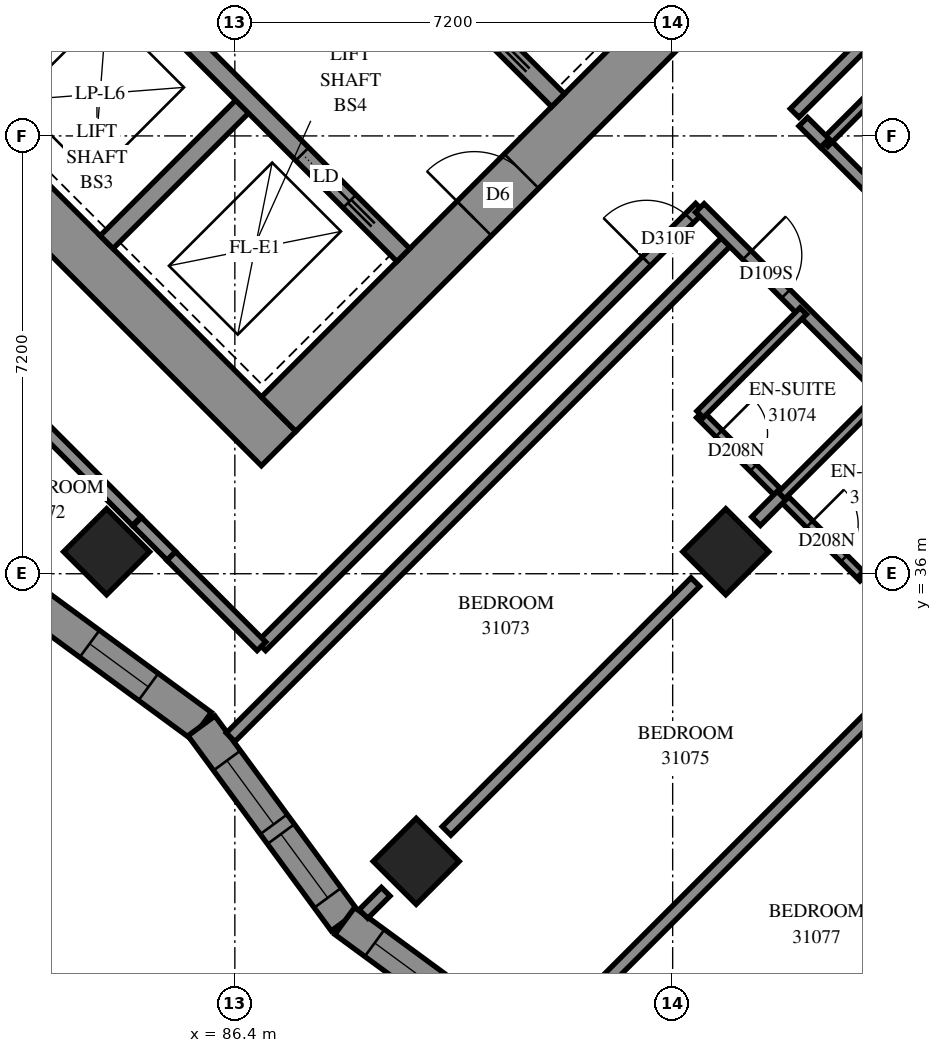
"""IFC4 building model, lengths in metres.
Left out: names, types, materials, properties, quantities, classifications, styles, units other than length and angle.
Written with IfcOpenShell. Run it as: python <this file> out.ifc"""

import sys

from ifc_helpers import new_model, si_unit, direction, frame, frame_2d, origin, origin_2d, place, context, subcontext, project, spatial, polyline, rectangle, outline, extrude, element, fill, save


model = new_model("IFC4")
c1 = context("Model", 3, precision=1e-05, world=origin(), true_north=direction((0.0, 1.0)))
c2 = subcontext(c1, "Body", "Model", "MODEL_VIEW")
j1 = project(units=[si_unit("LENGTHUNIT", "METRE"), si_unit("PLANEANGLEUNIT", "RADIAN")], contexts=[c1])
p1 = place(None, origin())
s1 = spatial("IfcSite", under=j1, at=p1, CompositionType="ELEMENT")
p2 = place(p1, origin())
s2 = spatial("IfcBuilding", under=s1, at=p2, CompositionType="ELEMENT")
p3 = place(p2, frame((0.0, 0.0, 115.2)))
s3 = spatial("IfcBuildingStorey", under=s2, at=p3, CompositionType="ELEMENT", Elevation=115.2)
for number, where, z_axis, x_axis in (
    (1, (84.291, 36.362, 0.0), (0.0, 0.0, 1.0), (0.707, -0.707, 0.0)),
    (2, (94.474, 36.362, 0.0), (0.0, 0.0, 1.0), (0.707, -0.707, 0.0)),
    (3, (89.382, 31.271, 0.0), (0.0, 0.0, 1.0), (0.707, -0.707, 0.0)),
):
    element("IfcColumn", number, at=place(p3, frame(where, z_axis=z_axis, x_axis=x_axis)), inside=s3, PredefinedType="COLUMN", context=c2, shape_type="SweptSolid", body=[
        extrude(rectangle(XDim=1.0, YDim=1.0, at=origin_2d()), origin(), (0.0, 0.0, 1.0), 3.1),
    ])
p4 = place(p3, frame((75.806, 49.373, -0.3), z_axis=(0.0, 0.0, 1.0), x_axis=(0.7071067812, -0.7071067812, 0.0)))
e4 = element("IfcWall", 4, at=p4, inside=s3, PredefinedType="SHEAR", context=c2, shape_type="SweptSolid", body=[
    extrude(rectangle(XDim=16.0, YDim=0.8, at=frame_2d((8.0, 0.0))), origin(), (0.0, 0.0, 1.0), 2.7),
])
p5 = place(p3, frame((87.12, 38.625, -0.3), z_axis=(0.0, 0.0, 1.0), x_axis=(0.7071067812, 0.7071067812, 0.0)))
e5 = element("IfcWall", 5, at=p5, inside=s3, PredefinedType="SHEAR", context=c2, shape_type="SweptSolid", body=[
    extrude(rectangle(XDim=14.4, YDim=0.8, at=frame_2d((7.2, 0.0))), origin(), (0.0, 0.0, 1.0), 2.7),
])
p6 = place(p5, frame((4.55, 0.0, 0.3)))
e6 = element("IfcOpeningElement", 6, at=p6, cuts=e5, PredefinedType="OPENING", context=c2, shape_type="SweptSolid", body=[
    extrude(rectangle(XDim=1.1, YDim=2.1, at=frame_2d((0.55, 1.05))), frame((0.0, 0.41, 0.0), z_axis=(0.0, -1.0, 0.0), x_axis=(1.0, 0.0, 0.0)), (0.0, 0.0, 1.0), 0.82),
])
p7 = place(p5, frame((11.35, 0.0, 0.3)))
e7 = element("IfcOpeningElement", 7, at=p7, cuts=e5, PredefinedType="OPENING", context=c2, shape_type="SweptSolid", body=[
    extrude(rectangle(XDim=1.1, YDim=2.1, at=frame_2d((0.55, 1.05))), frame((0.0, 0.41, 0.0), z_axis=(0.0, -1.0, 0.0), x_axis=(1.0, 0.0, 0.0)), (0.0, 0.0, 1.0), 0.82),
])
for number, where, z_axis, x_axis in (
    (8, (81.746, 43.999, 0.0), (0.0, 0.0, 1.0), (0.707, 0.707, 0.0)),
    (9, (84.291, 41.453, 0.0), (0.0, 0.0, 1.0), (0.707, 0.707, 0.0)),
):
    element("IfcWall", number, at=place(p3, frame(where, z_axis=z_axis, x_axis=x_axis)), inside=s3, PredefinedType="SOLIDWALL", context=c2, shape_type="SweptSolid", body=[
        extrude(rectangle(XDim=3.3, YDim=0.3, at=frame_2d((1.65, 0.0))), origin(), (0.0, 0.0, 1.0), 3.1),
    ])
p8 = place(p3, frame((78.988, 51.423, 0.0), z_axis=(0.0, 0.0, 1.0), x_axis=(0.7071067812, -0.7071067812, 0.0)))
e10 = element("IfcWall", 10, at=p8, inside=s3, PredefinedType="SOLIDWALL", context=c2, shape_type="SweptSolid", body=[
    extrude(rectangle(XDim=14.4, YDim=0.3, at=frame_2d((7.2, 0.0))), origin(), (0.0, 0.0, 1.0), 3.1),
])
p9 = place(p8, frame((1.25, 0.0, 0.0)))
e11 = element("IfcOpeningElement", 11, at=p9, cuts=e10, PredefinedType="OPENING", context=c2, shape_type="SweptSolid", body=[
    extrude(rectangle(XDim=1.1, YDim=2.1, at=frame_2d((0.55, 1.05))), frame((0.0, 0.16, 0.0), z_axis=(0.0, -1.0, 0.0), x_axis=(1.0, 0.0, 0.0)), (0.0, 0.0, 1.0), 0.32),
])
p10 = place(p8, frame((4.85, 0.0, 0.0)))
e12 = element("IfcOpeningElement", 12, at=p10, cuts=e10, PredefinedType="OPENING", context=c2, shape_type="SweptSolid", body=[
    extrude(rectangle(XDim=1.1, YDim=2.1, at=frame_2d((0.55, 1.05))), frame((0.0, 0.16, 0.0), z_axis=(0.0, -1.0, 0.0), x_axis=(1.0, 0.0, 0.0)), (0.0, 0.0, 1.0), 0.32),
])
p11 = place(p8, frame((8.45, 0.0, 0.0)))
e13 = element("IfcOpeningElement", 13, at=p11, cuts=e10, PredefinedType="OPENING", context=c2, shape_type="SweptSolid", body=[
    extrude(rectangle(XDim=1.1, YDim=2.1, at=frame_2d((0.55, 1.05))), frame((0.0, 0.16, 0.0), z_axis=(0.0, -1.0, 0.0), x_axis=(1.0, 0.0, 0.0)), (0.0, 0.0, 1.0), 0.32),
])
p12 = place(p8, frame((12.05, 0.0, 0.0)))
e14 = element("IfcOpeningElement", 14, at=p12, cuts=e10, PredefinedType="OPENING", context=c2, shape_type="SweptSolid", body=[
    extrude(rectangle(XDim=1.1, YDim=2.1, at=frame_2d((0.55, 1.05))), frame((0.0, 0.16, 0.0), z_axis=(0.0, -1.0, 0.0), x_axis=(1.0, 0.0, 0.0)), (0.0, 0.0, 1.0), 0.32),
])
p13 = place(p3, frame((81.534, 53.969, 0.0), z_axis=(0.0, 0.0, 1.0), x_axis=(0.707103309, -0.7071102534, 0.0)))
e15 = element("IfcWall", 15, at=p13, inside=s3, PredefinedType="SOLIDWALL", context=c2, shape_type="SweptSolid", body=[
    extrude(rectangle(XDim=14.4, YDim=0.3, at=frame_2d((7.2, 0.0))), origin(), (0.0, 0.0, 1.0), 3.1),
])
p14 = place(p13, frame((12.05, 0.0, 0.0)))
e16 = element("IfcOpeningElement", 16, at=p14, cuts=e15, PredefinedType="OPENING", context=c2, shape_type="SweptSolid", body=[
    extrude(rectangle(XDim=1.1, YDim=2.1, at=frame_2d((0.55, 1.05))), frame((0.0, 0.16, 0.0), z_axis=(0.0, -1.0, 0.0), x_axis=(1.0, 0.0, 0.0)), (0.0, 0.0, 1.0), 0.32),
])
p15 = place(p3, frame((82.643, 35.854, 0.0), z_axis=(0.0, 0.0, 1.0), x_axis=(0.8060606099, -0.5918329943, 0.0)))
e17 = element("IfcWall", 17, at=p15, inside=s3, PredefinedType="SOLIDWALL", context=c2, shape_type="SweptSolid", body=[
    extrude(outline(polyline([(-0.042, -0.275), (3.938, -0.275), (4.022, 0.275), (0.042, 0.275), (-0.042, -0.275)])), origin(), (0.0, 0.0, 1.0), 3.1),
])
p16 = place(p15, frame((1.698, 0.0, 0.5)))
e18 = element("IfcOpeningElement", 18, at=p16, cuts=e17, PredefinedType="OPENING", context=c2, shape_type="SweptSolid", body=[
    extrude(rectangle(XDim=1.2, YDim=2.45, at=frame_2d((0.6, 1.225))), frame((0.0, 0.285, 0.0), z_axis=(0.0, -1.0, 0.0), x_axis=(1.0, 0.0, 0.0)), (0.0, 0.0, 1.0), 0.57),
])
p17 = place(p3, frame((85.851, 33.498, 0.0), z_axis=(0.0, 0.0, 1.0), x_axis=(0.5918329943, -0.8060606099, 0.0)))
e19 = element("IfcWall", 19, at=p17, inside=s3, PredefinedType="SOLIDWALL", context=c2, shape_type="SweptSolid", body=[
    extrude(outline(polyline([(0.042, -0.275), (4.022, -0.275), (3.938, 0.275), (-0.042, 0.275), (0.042, -0.275)])), origin(), (0.0, 0.0, 1.0), 3.1),
])
p18 = place(p17, frame((0.708, 0.0, 0.5)))
e20 = element("IfcOpeningElement", 20, at=p18, cuts=e19, PredefinedType="OPENING", context=c2, shape_type="SweptSolid", body=[
    extrude(rectangle(XDim=1.3, YDim=2.45, at=frame_2d((0.65, 1.225))), frame((0.0, 0.285, 0.0), z_axis=(0.0, -1.0, 0.0), x_axis=(1.0, 0.0, 0.0)), (0.0, 0.0, 1.0), 0.57),
])
p19 = place(p17, frame((2.208, 0.0, 0.5)))
e21 = element("IfcOpeningElement", 21, at=p19, cuts=e19, PredefinedType="OPENING", context=c2, shape_type="SweptSolid", body=[
    extrude(rectangle(XDim=1.3, YDim=2.45, at=frame_2d((0.65, 1.225))), frame((0.0, 0.285, 0.0), z_axis=(0.0, -1.0, 0.0), x_axis=(1.0, 0.0, 0.0)), (0.0, 0.0, 1.0), 0.57),
])
p20 = place(p3, frame((88.207, 30.29, 0.0), z_axis=(0.0, 0.0, 1.0), x_axis=(0.8060813944, -0.5918046853, 0.0)))
e22 = element("IfcWall", 22, at=p20, inside=s3, PredefinedType="SOLIDWALL", context=c2, shape_type="SweptSolid", body=[
    extrude(outline(polyline([(-0.042, -0.275), (3.938, -0.275), (4.022, 0.275), (0.042, 0.275), (-0.042, -0.275)])), origin(), (0.0, 0.0, 1.0), 3.1),
])
p21 = place(p20, frame((0.611, 0.0, 0.5)))
e23 = element("IfcOpeningElement", 23, at=p21, cuts=e22, PredefinedType="OPENING", context=c2, shape_type="SweptSolid", body=[
    extrude(rectangle(XDim=1.3, YDim=2.45, at=frame_2d((0.65, 1.225))), frame((0.0, 0.285, 0.0), z_axis=(0.0, -1.0, 0.0), x_axis=(1.0, 0.0, 0.0)), (0.0, 0.0, 1.0), 0.57),
])
p22 = place(p20, frame((2.111, 0.0, 0.5)))
e24 = element("IfcOpeningElement", 24, at=p22, cuts=e22, PredefinedType="OPENING", context=c2, shape_type="SweptSolid", body=[
    extrude(rectangle(XDim=1.3, YDim=2.45, at=frame_2d((0.65, 1.225))), frame((0.0, 0.285, 0.0), z_axis=(0.0, -1.0, 0.0), x_axis=(1.0, 0.0, 0.0)), (0.0, 0.0, 1.0), 0.57),
])
p23 = place(p3, frame((96.469, 23.086, 0.0), z_axis=(0.0, 0.0, 1.0), x_axis=(0.7071067812, 0.7071067812, 0.0)))
e25 = element("IfcWall", 25, at=p23, inside=s3, PredefinedType="PARTITIONING", context=c2, shape_type="SweptSolid", body=[
    extrude(rectangle(XDim=11.677, YDim=0.2, at=frame_2d((5.838, 0.0))), origin(), (0.0, 0.0, 1.0), 3.1),
])
p24 = place(p3, frame((86.33, 33.311, 0.0), z_axis=(0.0, 0.0, 1.0), x_axis=(0.7071067812, 0.7071067812, 0.0)))
e26 = element("IfcWall", 26, at=p24, inside=s3, PredefinedType="PARTITIONING", context=c2, shape_type="SweptSolid", body=[
    extrude(rectangle(XDim=11.616, YDim=0.2, at=frame_2d((5.808, 0.0))), origin(), (0.0, 0.0, 1.0), 3.1),
])
p25 = place(p3, frame((91.451, 28.249, 0.0), z_axis=(0.0, 0.0, 1.0), x_axis=(0.7071067812, 0.7071067812, 0.0)))
e27 = element("IfcWall", 27, at=p25, inside=s3, PredefinedType="PARTITIONING", context=c2, shape_type="SweptSolid", body=[
    extrude(rectangle(XDim=11.574, YDim=0.2, at=frame_2d((5.787, 0.0))), origin(), (0.0, 0.0, 1.0), 3.1),
])
p26 = place(p3, frame((86.835, 34.806, 0.0), z_axis=(0.0, 0.0, 1.0), x_axis=(0.7071067812, 0.7071067812, 0.0)))
e28 = element("IfcWall", 28, at=p26, inside=s3, PredefinedType="PARTITIONING", context=c2, shape_type="SweptSolid", body=[
    extrude(rectangle(XDim=10.201, YDim=0.2, at=frame_2d((5.1, 0.0))), origin(), (0.0, 0.0, 1.0), 3.1),
])
p27 = place(p26, frame((8.959, 0.0, 0.0)))
e29 = element("IfcOpeningElement", 29, at=p27, cuts=e28, PredefinedType="OPENING", context=c2, shape_type="SweptSolid", body=[
    extrude(rectangle(XDim=1.0, YDim=2.1, at=frame_2d((0.5, 1.05))), frame((0.0, 0.11, 0.0), z_axis=(0.0, -1.0, 0.0), x_axis=(1.0, 0.0, 0.0)), (0.0, 0.0, 1.0), 0.22),
])
p28 = place(p3, frame((94.047, 42.015, 0.0), z_axis=(0.0, 0.0, 1.0), x_axis=(0.7071067812, -0.7071067812, 0.0)))
e30 = element("IfcWall", 30, at=p28, inside=s3, PredefinedType="PARTITIONING", context=c2, shape_type="SweptSolid", body=[
    extrude(rectangle(XDim=9.6, YDim=0.2, at=frame_2d((4.8, 0.0))), origin(), (0.0, 0.0, 1.0), 3.1),
])
p29 = place(p28, frame((1.099, 0.0, 0.0)))
e31 = element("IfcOpeningElement", 31, at=p29, cuts=e30, PredefinedType="OPENING", context=c2, shape_type="SweptSolid", body=[
    extrude(rectangle(XDim=0.9, YDim=2.1, at=frame_2d((0.45, 1.05))), frame((0.0, 0.11, 0.0), z_axis=(0.0, -1.0, 0.0), x_axis=(1.0, 0.0, 0.0)), (0.0, 0.0, 1.0), 0.22),
])
p30 = place(p28, frame((6.649, 0.0, 0.0)))
e32 = element("IfcOpeningElement", 32, at=p30, cuts=e30, PredefinedType="OPENING", context=c2, shape_type="SweptSolid", body=[
    extrude(rectangle(XDim=0.9, YDim=2.1, at=frame_2d((0.45, 1.05))), frame((0.0, 0.11, 0.0), z_axis=(0.0, -1.0, 0.0), x_axis=(1.0, 0.0, 0.0)), (0.0, 0.0, 1.0), 0.22),
])
p31 = place(p28, frame((8.3, 0.0, 0.0)))
e33 = element("IfcOpeningElement", 33, at=p31, cuts=e30, PredefinedType="OPENING", context=c2, shape_type="SweptSolid", body=[
    extrude(rectangle(XDim=0.9, YDim=2.1, at=frame_2d((0.45, 1.05))), frame((0.0, 0.11, 0.0), z_axis=(0.0, -1.0, 0.0), x_axis=(1.0, 0.0, 0.0)), (0.0, 0.0, 1.0), 0.22),
])
p32 = place(p3, frame((96.103, 43.083, 0.0), z_axis=(0.0, 0.0, 1.0), x_axis=(0.7071067812, -0.7071067812, 0.0)))
e34 = element("IfcWall", 34, at=p32, inside=s3, PredefinedType="PARTITIONING", context=c2, shape_type="SweptSolid", body=[
    extrude(rectangle(XDim=8.491, YDim=0.2, at=frame_2d((4.245, 0.0))), origin(), (0.0, 0.0, 1.0), 3.1),
])
p33 = place(p32, frame((1.995, 0.0, 0.0)))
e35 = element("IfcOpeningElement", 35, at=p33, cuts=e34, PredefinedType="OPENING", context=c2, shape_type="SweptSolid", body=[
    extrude(rectangle(XDim=0.9, YDim=2.1, at=frame_2d((0.45, 1.05))), frame((0.0, 0.11, 0.0), z_axis=(0.0, -1.0, 0.0), x_axis=(1.0, 0.0, 0.0)), (0.0, 0.0, 1.0), 0.22),
])
p34 = place(p32, frame((4.27, 0.0, 0.0)))
e36 = element("IfcOpeningElement", 36, at=p34, cuts=e34, PredefinedType="OPENING", context=c2, shape_type="SweptSolid", body=[
    extrude(rectangle(XDim=0.9, YDim=2.1, at=frame_2d((0.45, 1.05))), frame((0.0, 0.11, 0.0), z_axis=(0.0, -1.0, 0.0), x_axis=(1.0, 0.0, 0.0)), (0.0, 0.0, 1.0), 0.22),
])
p35 = place(p3, frame((95.606, 43.577, 0.0), z_axis=(0.0, 0.0, 1.0), x_axis=(0.7071067812, 0.7071067812, 0.0)))
e37 = element("IfcWall", 37, at=p35, inside=s3, PredefinedType="PARTITIONING", context=c2, shape_type="SweptSolid", body=[
    extrude(rectangle(XDim=7.798, YDim=0.2, at=frame_2d((3.899, 0.0))), origin(), (0.0, 0.0, 1.0), 3.1),
])
p36 = place(p3, frame((80.197, 41.453, 0.0), z_axis=(0.0, 0.0, 1.0), x_axis=(0.7071067812, -0.7071067812, 0.0)))
e38 = element("IfcWall", 38, at=p36, inside=s3, PredefinedType="PARTITIONING", context=c2, shape_type="SweptSolid", body=[
    extrude(rectangle(XDim=6.488, YDim=0.2, at=frame_2d((3.244, 0.0))), origin(), (0.0, 0.0, 1.0), 3.1),
])
p37 = place(p3, frame((89.881, 31.771, 0.0), z_axis=(0.0, 0.0, 1.0), x_axis=(0.7071067812, 0.7071067812, 0.0)))
e39 = element("IfcWall", 39, at=p37, inside=s3, PredefinedType="PARTITIONING", context=c2, shape_type="SweptSolid", body=[
    extrude(rectangle(XDim=5.787, YDim=0.2, at=frame_2d((2.893, 0.0))), origin(), (0.0, 0.0, 1.0), 3.1),
])
p38 = place(p3, frame((94.973, 26.681, 0.0), z_axis=(0.0, 0.0, 1.0), x_axis=(0.7071067812, 0.7071067812, 0.0)))
e40 = element("IfcWall", 40, at=p38, inside=s3, PredefinedType="PARTITIONING", context=c2, shape_type="SweptSolid", body=[
    extrude(rectangle(XDim=5.784, YDim=0.2, at=frame_2d((2.892, 0.0))), origin(), (0.0, 0.0, 1.0), 3.1),
])
p39 = place(p3, frame((94.047, 38.621, 0.0), z_axis=(0.0, 0.0, 1.0), x_axis=(0.7071067812, -0.7071067812, 0.0)))
e41 = element("IfcWall", 41, at=p39, inside=s3, PredefinedType="PARTITIONING", context=c2, shape_type="SweptSolid", body=[
    extrude(rectangle(XDim=3.799, YDim=0.15, at=frame_2d((1.899, 0.0))), origin(), (0.0, 0.0, 1.0), 3.1),
])
p40 = place(p39, frame((0.444, 0.0, 0.0)))
e42 = element("IfcOpeningElement", 42, at=p40, cuts=e41, PredefinedType="OPENING", context=c2, shape_type="SweptSolid", body=[
    extrude(rectangle(XDim=0.8, YDim=2.1, at=frame_2d((0.4, 1.05))), frame((0.0, 0.085, 0.0), z_axis=(0.0, -1.0, 0.0), x_axis=(1.0, 0.0, 0.0)), (0.0, 0.0, 1.0), 0.17),
])
p41 = place(p39, frame((2.551, 0.0, 0.0)))
e43 = element("IfcOpeningElement", 43, at=p41, cuts=e41, PredefinedType="OPENING", context=c2, shape_type="SweptSolid", body=[
    extrude(rectangle(XDim=0.8, YDim=2.1, at=frame_2d((0.4, 1.05))), frame((0.0, 0.085, 0.0), z_axis=(0.0, -1.0, 0.0), x_axis=(1.0, 0.0, 0.0)), (0.0, 0.0, 1.0), 0.17),
])
for number, where, z_axis, x_axis in (
    (44, (95.389, 37.285, 0.0), (0.0, 0.0, 1.0), (0.708, 0.707, 0.0)),
    (45, (94.052, 38.622, 0.0), (0.0, 0.0, 1.0), (0.707, 0.708, 0.0)),
    (46, (96.739, 35.935, 0.0), (0.0, 0.0, 1.0), (0.708, 0.707, 0.0)),
):
    element("IfcWall", number, at=place(p3, frame(where, z_axis=z_axis, x_axis=x_axis)), inside=s3, PredefinedType="PARTITIONING", context=c2, shape_type="SweptSolid", body=[
        extrude(rectangle(XDim=2.4, YDim=0.15, at=frame_2d((1.2, 0.0))), origin(), (0.0, 0.0, 1.0), 3.1),
    ])
p42 = place(p3, frame((96.099, 43.081, 0.0), z_axis=(0.0, 0.0, 1.0), x_axis=(0.7071067812, 0.7071067812, 0.0)))
e47 = element("IfcWall", 47, at=p42, inside=s3, PredefinedType="PARTITIONING", context=c2, shape_type="SweptSolid", body=[
    extrude(rectangle(XDim=2.398, YDim=0.15, at=frame_2d((1.199, 0.0))), origin(), (0.0, 0.0, 1.0), 3.1),
])
p43 = place(p3, frame((85.353, 36.293, 0.0), z_axis=(0.0, 0.0, 1.0), x_axis=(0.7066304548, -0.7075827869, 0.0)))
e48 = element("IfcWall", 48, at=p43, inside=s3, PredefinedType="PARTITIONING", context=c2, shape_type="SweptSolid", body=[
    extrude(rectangle(XDim=2.1, YDim=0.2, at=frame_2d((1.05, 0.0))), origin(), (0.0, 0.0, 1.0), 3.1),
])
p44 = place(p3, frame((84.795, 36.855, 0.0), z_axis=(0.0, 0.0, 1.0), x_axis=(0.7071067812, -0.7071067812, 0.0)))
e49 = element("IfcWall", 49, at=p44, inside=s3, PredefinedType="PARTITIONING", context=c2, shape_type="SweptSolid", body=[
    extrude(rectangle(XDim=0.792, YDim=0.2, at=frame_2d((0.396, 0.0))), origin(), (0.0, 0.0, 1.0), 3.1),
])
p45 = place(p3, frame((94.971, 36.865, 0.0), z_axis=(0.0, 0.0, 1.0), x_axis=(0.7054171665, 0.7087923682, 0.0)))
e50 = element("IfcWall", 50, at=p45, inside=s3, PredefinedType="PARTITIONING", context=c2, shape_type="SweptSolid", body=[
    extrude(rectangle(XDim=0.593, YDim=0.2, at=frame_2d((0.296, 0.0))), origin(), (0.0, 0.0, 1.0), 3.1),
])
p46 = place(p3, frame((95.747, 43.433, 0.0), z_axis=(0.0, 0.0, 1.0), x_axis=(0.7091070712, -0.7051008166, 0.0)))
e51 = element("IfcWall", 51, at=p46, inside=s3, PredefinedType="PARTITIONING", context=c2, shape_type="SweptSolid", body=[
    extrude(rectangle(XDim=0.499, YDim=0.2, at=frame_2d((0.25, 0.0))), origin(), (0.0, 0.0, 1.0), 3.1),
])
p47 = place(p3, frame((88.515, 30.405, 0.0), z_axis=(0.0, 0.0, 1.0), x_axis=(0.7070102149, 0.7072033343, 0.0)))
e52 = element("IfcWall", 52, at=p47, inside=s3, PredefinedType="PARTITIONING", context=c2, shape_type="SweptSolid", body=[
    extrude(rectangle(XDim=0.518, YDim=0.2, at=frame_2d((0.259, 0.0))), origin(), (0.0, 0.0, 1.0), 3.1),
])
p48 = place(p16, origin())
e53 = element("IfcWindow", 53, at=p48, inside=s3, PartitioningType="SINGLE_PANEL", PredefinedType="WINDOW", context=c2, shape_type="SweptSolid", body=[
    extrude(rectangle(XDim=1.2, YDim=2.45, at=frame_2d((0.6, 1.225))), frame((0.0, 0.155, 0.0), z_axis=(0.0, -1.0, 0.0), x_axis=(1.0, 0.0, 0.0)), (0.0, 0.0, 1.0), 0.06),
])
fill(e18, e53)
p49 = place(p18, origin())
e54 = element("IfcWindow", 54, at=p49, inside=s3, PartitioningType="SINGLE_PANEL", PredefinedType="WINDOW", context=c2, shape_type="SweptSolid", body=[
    extrude(rectangle(XDim=1.3, YDim=2.45, at=frame_2d((0.65, 1.225))), frame((0.0, 0.155, 0.0), z_axis=(0.0, -1.0, 0.0), x_axis=(1.0, 0.0, 0.0)), (0.0, 0.0, 1.0), 0.06),
])
fill(e20, e54)
p50 = place(p19, origin())
e55 = element("IfcWindow", 55, at=p50, inside=s3, PartitioningType="SINGLE_PANEL", PredefinedType="WINDOW", context=c2, shape_type="SweptSolid", body=[
    extrude(rectangle(XDim=1.3, YDim=2.45, at=frame_2d((0.65, 1.225))), frame((0.0, 0.155, 0.0), z_axis=(0.0, -1.0, 0.0), x_axis=(1.0, 0.0, 0.0)), (0.0, 0.0, 1.0), 0.06),
])
fill(e21, e55)
p51 = place(p21, origin())
e56 = element("IfcWindow", 56, at=p51, inside=s3, PartitioningType="SINGLE_PANEL", PredefinedType="WINDOW", context=c2, shape_type="SweptSolid", body=[
    extrude(rectangle(XDim=1.3, YDim=2.45, at=frame_2d((0.65, 1.225))), frame((0.0, 0.155, 0.0), z_axis=(0.0, -1.0, 0.0), x_axis=(1.0, 0.0, 0.0)), (0.0, 0.0, 1.0), 0.06),
])
fill(e23, e56)
p52 = place(p6, origin())
e57 = element("IfcDoor", 57, at=p52, inside=s3, OperationType="DOUBLE_DOOR_SINGLE_SWING", PredefinedType="DOOR", context=c2, shape_type="SweptSolid", body=[
    extrude(rectangle(XDim=1.1, YDim=2.1, at=frame_2d((0.55, 1.05))), frame((0.0, 0.025, 0.0), z_axis=(0.0, -1.0, 0.0), x_axis=(1.0, 0.0, 0.0)), (0.0, 0.0, 1.0), 0.05),
])
fill(e6, e57)
p53 = place(p12, origin())
e58 = element("IfcDoor", 58, at=p53, inside=s3, OperationType="SLIDING_TO_RIGHT", PredefinedType="DOOR", context=c2, shape_type="SweptSolid", body=[
    extrude(rectangle(XDim=1.1, YDim=2.1, at=frame_2d((0.55, 1.05))), frame((0.0, 0.025, 0.0), z_axis=(0.0, -1.0, 0.0), x_axis=(1.0, 0.0, 0.0)), (0.0, 0.0, 1.0), 0.05),
])
fill(e14, e58)
p54 = place(p27, origin())
e59 = element("IfcDoor", 59, at=p54, inside=s3, OperationType="SINGLE_SWING_LEFT", PredefinedType="DOOR", context=c2, shape_type="SweptSolid", body=[
    extrude(rectangle(XDim=1.0, YDim=2.1, at=frame_2d((0.5, 1.05))), frame((0.0, 0.025, 0.0), z_axis=(0.0, -1.0, 0.0), x_axis=(1.0, 0.0, 0.0)), (0.0, 0.0, 1.0), 0.05),
])
fill(e29, e59)
p55 = place(p29, origin())
e60 = element("IfcDoor", 60, at=p55, inside=s3, OperationType="SINGLE_SWING_LEFT", PredefinedType="DOOR", context=c2, shape_type="SweptSolid", body=[
    extrude(rectangle(XDim=0.9, YDim=2.1, at=frame_2d((0.45, 1.05))), frame((0.0, 0.025, 0.0), z_axis=(0.0, -1.0, 0.0), x_axis=(1.0, 0.0, 0.0)), (0.0, 0.0, 1.0), 0.05),
])
fill(e31, e60)
p56 = place(p40, origin())
e61 = element("IfcDoor", 61, at=p56, inside=s3, OperationType="SINGLE_SWING_RIGHT", PredefinedType="DOOR", context=c2, shape_type="SweptSolid", body=[
    extrude(rectangle(XDim=0.8, YDim=2.1, at=frame_2d((0.4, 1.05))), frame((0.0, 0.025, 0.0), z_axis=(0.0, -1.0, 0.0), x_axis=(1.0, 0.0, 0.0)), (0.0, 0.0, 1.0), 0.05),
])
fill(e42, e61)
p57 = place(p41, origin())
e62 = element("IfcDoor", 62, at=p57, inside=s3, OperationType="SINGLE_SWING_RIGHT", PredefinedType="DOOR", context=c2, shape_type="SweptSolid", body=[
    extrude(rectangle(XDim=0.8, YDim=2.1, at=frame_2d((0.4, 1.05))), frame((0.0, 0.025, 0.0), z_axis=(0.0, -1.0, 0.0), x_axis=(1.0, 0.0, 0.0)), (0.0, 0.0, 1.0), 0.05),
])
fill(e43, e62)
save(model, sys.argv[1])
